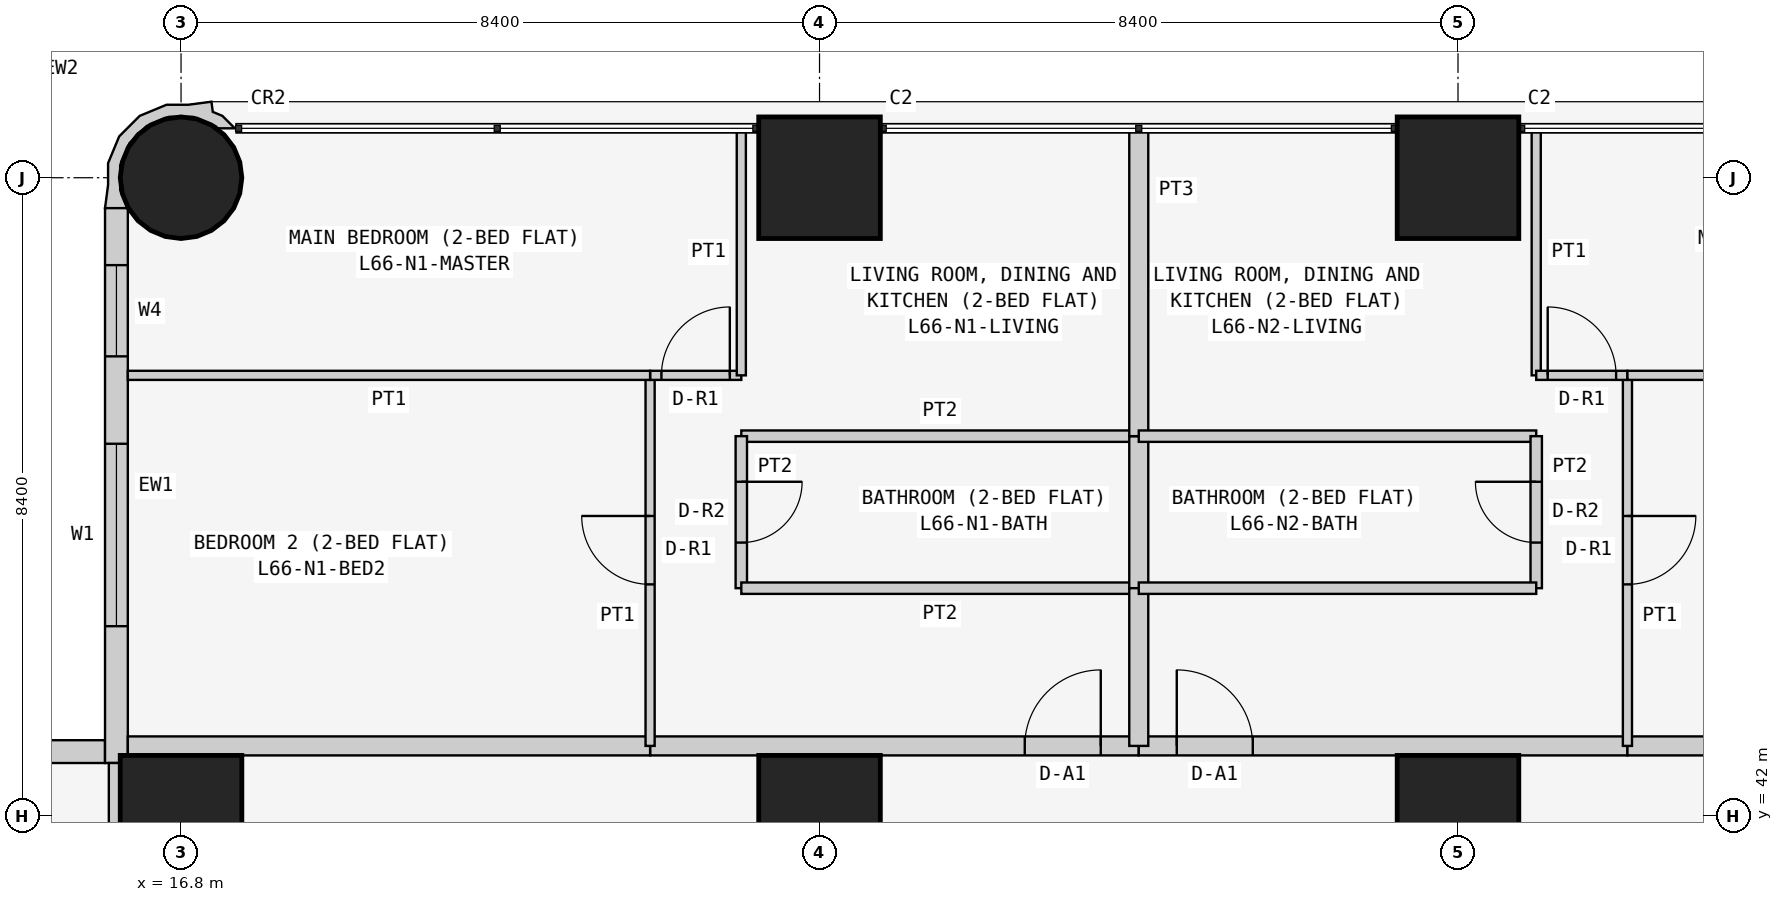
"""IFC4 building model, lengths in metres.
Left out: names, types, materials, properties, quantities, classifications, styles, units other than length and angle.
Written with IfcOpenShell. Run it as: python <this file> out.ifc"""

import sys

from ifc_helpers import new_model, si_unit, direction, frame, frame_2d, origin, origin_2d, place, context, subcontext, project, spatial, polyline, rectangle, circle, outline, extrude, element, fill, save


model = new_model("IFC4")
c1 = context("Model", 3, precision=1e-05, world=origin(), true_north=direction((0.0, 1.0)))
c2 = subcontext(c1, "Body", "Model", "MODEL_VIEW")
j1 = project(units=[si_unit("LENGTHUNIT", "METRE"), si_unit("PLANEANGLEUNIT", "RADIAN")], contexts=[c1])
p1 = place(None, origin())
s1 = spatial("IfcSite", under=j1, at=p1, CompositionType="ELEMENT")
p2 = place(p1, origin())
s2 = spatial("IfcBuilding", under=s1, at=p2, CompositionType="ELEMENT")
p3 = place(p2, frame((0.0, 0.0, 254.1)))
s3 = spatial("IfcBuildingStorey", under=s2, at=p3, CompositionType="ELEMENT", Elevation=254.1)
p4 = place(p3, frame((16.8, 42.0, 0.0), z_axis=(0.0, 0.0, 1.0), x_axis=(1.0, 0.0, 0.0)))
e1 = element("IfcColumn", 1, at=p4, inside=s3, PredefinedType="COLUMN", context=c2, shape_type="SweptSolid", body=[
    extrude(rectangle(XDim=1.6, YDim=1.6, at=origin_2d()), origin(), (0.0, 0.0, 1.0), 3.6),
])
p5 = place(p3, frame((16.8, 50.4, 0.0), z_axis=(0.0, 0.0, 1.0), x_axis=(1.0, 0.0, 0.0)))
e2 = element("IfcColumn", 2, at=p5, inside=s3, PredefinedType="COLUMN", context=c2, shape_type="SweptSolid", body=[
    extrude(circle(Radius=0.8, at=origin_2d()), origin(), (0.0, 0.0, 1.0), 3.6),
])
for number, where, z_axis, x_axis in (
    (3, (25.2, 42.0, 0.0), (0.0, 0.0, 1.0), (1.0, 0.0, 0.0)),
    (4, (25.2, 50.4, 0.0), (0.0, 0.0, 1.0), (1.0, 0.0, 0.0)),
    (5, (33.6, 42.0, 0.0), (0.0, 0.0, 1.0), (1.0, 0.0, 0.0)),
    (6, (33.6, 50.4, 0.0), (0.0, 0.0, 1.0), (1.0, 0.0, 0.0)),
):
    element("IfcColumn", number, at=place(p3, frame(where, z_axis=z_axis, x_axis=x_axis)), inside=s3, PredefinedType="COLUMN", context=c2, shape_type="SweptSolid", body=[
        extrude(rectangle(XDim=1.6, YDim=1.6, at=origin_2d()), origin(), (0.0, 0.0, 1.0), 3.6),
    ])
p6 = place(p3, frame((15.8, 42.85, 0.0), z_axis=(0.0, 0.0, 1.0), x_axis=(-1.0, 0.0, 0.0)))
e7 = element("IfcWall", 7, at=p6, inside=s3, PredefinedType="SOLIDWALL", context=c2, shape_type="SweptSolid", body=[
    extrude(rectangle(XDim=7.0, YDim=0.3, at=frame_2d((3.5, 0.0))), origin(), (0.0, 0.0, 1.0), 3.45),
])
p7 = place(p6, frame((1.5, 0.0, 0.9)))
e8 = element("IfcOpeningElement", 8, at=p7, cuts=e7, PredefinedType="OPENING", context=c2, shape_type="SweptSolid", body=[
    extrude(rectangle(XDim=2.4, YDim=1.5, at=frame_2d((1.2, 0.75))), frame((0.0, 0.16, 0.0), z_axis=(0.0, -1.0, 0.0), x_axis=(1.0, 0.0, 0.0)), (0.0, 0.0, 1.0), 0.32),
])
p8 = place(p6, frame((5.05, 0.0, 0.9)))
e9 = element("IfcOpeningElement", 9, at=p8, cuts=e7, PredefinedType="OPENING", context=c2, shape_type="SweptSolid", body=[
    extrude(rectangle(XDim=1.2, YDim=1.5, at=frame_2d((0.6, 0.75))), frame((0.0, 0.16, 0.0), z_axis=(0.0, -1.0, 0.0), x_axis=(1.0, 0.0, 0.0)), (0.0, 0.0, 1.0), 0.32),
])
p9 = place(p3, frame((15.95, 50.0, 0.0), z_axis=(0.0, 0.0, 1.0), x_axis=(0.0, -1.0, 0.0)))
e10 = element("IfcWall", 10, at=p9, inside=s3, PredefinedType="SOLIDWALL", context=c2, shape_type="SweptSolid", body=[
    extrude(rectangle(XDim=7.3, YDim=0.3, at=frame_2d((3.65, 0.0))), origin(), (0.0, 0.0, 1.0), 3.45),
])
p10 = place(p9, frame((3.1, 0.0, 0.9)))
e11 = element("IfcOpeningElement", 11, at=p10, cuts=e10, PredefinedType="OPENING", context=c2, shape_type="SweptSolid", body=[
    extrude(rectangle(XDim=2.4, YDim=1.5, at=frame_2d((1.2, 0.75))), frame((0.0, 0.16, 0.0), z_axis=(0.0, -1.0, 0.0), x_axis=(1.0, 0.0, 0.0)), (0.0, 0.0, 1.0), 0.32),
])
p11 = place(p9, frame((0.75, 0.0, 0.9)))
e12 = element("IfcOpeningElement", 12, at=p11, cuts=e10, PredefinedType="OPENING", context=c2, shape_type="SweptSolid", body=[
    extrude(rectangle(XDim=1.2, YDim=1.5, at=frame_2d((0.6, 0.75))), frame((0.0, 0.16, 0.0), z_axis=(0.0, -1.0, 0.0), x_axis=(1.0, 0.0, 0.0)), (0.0, 0.0, 1.0), 0.32),
])
p12 = place(p3, frame((17.448, 50.995, 0.0), z_axis=(0.0, 0.0, 1.0), x_axis=(-0.343276641956, 0.93923434088, 0.0)))
e13 = element("IfcWall", 13, at=p12, inside=s3, PredefinedType="SOLIDWALL", context=c2, shape_type="SweptSolid", body=[
    extrude(outline(polyline([(0.241, 0.023), (0.333, 0.124), (0.465, 0.094), (0.532, 0.393), (0.631, 0.663), (0.614, 1.045), (0.454, 1.391), (0.172, 1.649), (-0.098, 1.748), (-0.369, 1.89), (-0.509, 1.621), (-0.491, 1.615), (-0.479, 1.609), (-0.211, 1.62), (0.088, 1.511), (0.323, 1.295), (0.457, 1.006), (0.47, 0.688), (0.361, 0.389), (0.145, 0.154), (0.108, 0.137), (0.031, -0.075), (0.241, 0.023)])), origin(), (0.0, 0.0, 1.0), 3.45),
])
p13 = place(p3, frame((22.971, 42.925, 0.0), z_axis=(0.0, 0.0, 1.0), x_axis=(1.0, 0.0, 0.0)))
e14 = element("IfcWall", 14, at=p13, inside=s3, PredefinedType="PARTITIONING", context=c2, shape_type="SweptSolid", body=[
    extrude(rectangle(XDim=6.429, YDim=0.25, at=frame_2d((3.214, 0.0))), origin(), (0.0, 0.0, 1.0), 3.45),
])
p14 = place(p13, frame((4.929, 0.0, 0.0)))
e15 = element("IfcOpeningElement", 15, at=p14, cuts=e14, PredefinedType="OPENING", context=c2, shape_type="SweptSolid", body=[
    extrude(rectangle(XDim=1.0, YDim=2.1, at=frame_2d((0.5, 1.05))), frame((0.0, 0.135, 0.0), z_axis=(0.0, -1.0, 0.0), x_axis=(1.0, 0.0, 0.0)), (0.0, 0.0, 1.0), 0.27),
])
p15 = place(p3, frame((16.1, 42.925, 0.0), z_axis=(0.0, 0.0, 1.0), x_axis=(1.0, 0.0, 0.0)))
e16 = element("IfcWall", 16, at=p15, inside=s3, PredefinedType="PARTITIONING", context=c2, shape_type="SweptSolid", body=[
    extrude(rectangle(XDim=6.871, YDim=0.25, at=frame_2d((3.436, 0.0))), origin(), (0.0, 0.0, 1.0), 3.45),
])
p16 = place(p3, frame((29.4, 42.925, 0.0), z_axis=(0.0, 0.0, 1.0), x_axis=(1.0, 0.0, 0.0)))
e17 = element("IfcWall", 17, at=p16, inside=s3, PredefinedType="PARTITIONING", context=c2, shape_type="SweptSolid", body=[
    extrude(rectangle(XDim=6.429, YDim=0.25, at=frame_2d((3.215, 0.0))), origin(), (0.0, 0.0, 1.0), 3.45),
])
p17 = place(p16, frame((0.5, 0.0, 0.0)))
e18 = element("IfcOpeningElement", 18, at=p17, cuts=e17, PredefinedType="OPENING", context=c2, shape_type="SweptSolid", body=[
    extrude(rectangle(XDim=1.0, YDim=2.1, at=frame_2d((0.5, 1.05))), frame((0.0, 0.135, 0.0), z_axis=(0.0, -1.0, 0.0), x_axis=(1.0, 0.0, 0.0)), (0.0, 0.0, 1.0), 0.27),
])
p18 = place(p3, frame((35.829, 42.925, 0.0), z_axis=(0.0, 0.0, 1.0), x_axis=(1.0, 0.0, 0.0)))
e19 = element("IfcWall", 19, at=p18, inside=s3, PredefinedType="PARTITIONING", context=c2, shape_type="SweptSolid", body=[
    extrude(rectangle(XDim=6.871, YDim=0.25, at=frame_2d((3.436, 0.0))), origin(), (0.0, 0.0, 1.0), 3.45),
])
p19 = place(p3, frame((15.925, 31.143, 0.0), z_axis=(0.0, 0.0, 1.0), x_axis=(0.0, 1.0, 0.0)))
e20 = element("IfcWall", 20, at=p19, inside=s3, PredefinedType="PARTITIONING", context=c2, shape_type="SweptSolid", body=[
    extrude(rectangle(XDim=11.557, YDim=0.15, at=frame_2d((5.778, 0.0))), origin(), (0.0, 0.0, 1.0), 3.45),
])
p20 = place(p3, frame((29.4, 47.0, 0.0), z_axis=(0.0, 0.0, 1.0), x_axis=(-1.0, 0.0, 0.0)))
e21 = element("IfcWall", 21, at=p20, inside=s3, PredefinedType="PARTITIONING", context=c2, shape_type="SweptSolid", body=[
    extrude(rectangle(XDim=5.229, YDim=0.15, at=frame_2d((2.615, 0.0))), origin(), (0.0, 0.0, 1.0), 3.45),
])
p21 = place(p3, frame((24.171, 47.0, 0.0), z_axis=(0.0, 0.0, 1.0), x_axis=(0.0, -1.0, 0.0)))
e22 = element("IfcWall", 22, at=p21, inside=s3, PredefinedType="PARTITIONING", context=c2, shape_type="SweptSolid", body=[
    extrude(rectangle(XDim=2.0, YDim=0.15, at=frame_2d((1.0, 0.0))), origin(), (0.0, 0.0, 1.0), 3.45),
])
p22 = place(p21, frame((0.6, 0.0, 0.0)))
e23 = element("IfcOpeningElement", 23, at=p22, cuts=e22, PredefinedType="OPENING", context=c2, shape_type="SweptSolid", body=[
    extrude(rectangle(XDim=0.8, YDim=2.1, at=frame_2d((0.4, 1.05))), frame((0.0, 0.085, 0.0), z_axis=(0.0, -1.0, 0.0), x_axis=(1.0, 0.0, 0.0)), (0.0, 0.0, 1.0), 0.17),
])
p23 = place(p3, frame((24.171, 45.0, 0.0), z_axis=(0.0, 0.0, 1.0), x_axis=(1.0, 0.0, 0.0)))
e24 = element("IfcWall", 24, at=p23, inside=s3, PredefinedType="PARTITIONING", context=c2, shape_type="SweptSolid", body=[
    extrude(rectangle(XDim=5.229, YDim=0.15, at=frame_2d((2.615, 0.0))), origin(), (0.0, 0.0, 1.0), 3.45),
])
p24 = place(p3, frame((29.4, 45.0, 0.0), z_axis=(0.0, 0.0, 1.0), x_axis=(0.0, 1.0, 0.0)))
e25 = element("IfcWall", 25, at=p24, inside=s3, PredefinedType="PARTITIONING", context=c2, shape_type="SweptSolid", body=[
    extrude(rectangle(XDim=2.0, YDim=0.25, at=frame_2d((1.0, 0.0))), origin(), (0.0, 0.0, 1.0), 2.848),
])
p25 = place(p3, frame((22.971, 42.925, 0.0), z_axis=(0.0, 0.0, 1.0), x_axis=(0.0, 1.0, 0.0)))
e26 = element("IfcWall", 26, at=p25, inside=s3, PredefinedType="PARTITIONING", context=c2, shape_type="SweptSolid", body=[
    extrude(rectangle(XDim=4.875, YDim=0.12, at=frame_2d((2.438, 0.0))), origin(), (0.0, 0.0, 1.0), 3.45),
])
p26 = place(p25, frame((2.125, 0.0, 0.0)))
e27 = element("IfcOpeningElement", 27, at=p26, cuts=e26, PredefinedType="OPENING", context=c2, shape_type="SweptSolid", body=[
    extrude(rectangle(XDim=0.9, YDim=2.1, at=frame_2d((0.45, 1.05))), frame((0.0, 0.07, 0.0), z_axis=(0.0, -1.0, 0.0), x_axis=(1.0, 0.0, 0.0)), (0.0, 0.0, 1.0), 0.14),
])
p27 = place(p3, frame((22.971, 47.8, 0.0), z_axis=(0.0, 0.0, 1.0), x_axis=(1.0, 0.0, 0.0)))
e28 = element("IfcWall", 28, at=p27, inside=s3, PredefinedType="PARTITIONING", context=c2, shape_type="SweptSolid", body=[
    extrude(rectangle(XDim=1.2, YDim=0.12, at=frame_2d((0.6, 0.0))), origin(), (0.0, 0.0, 1.0), 3.45),
])
p28 = place(p27, frame((0.149, 0.0, 0.0)))
e29 = element("IfcOpeningElement", 29, at=p28, cuts=e28, PredefinedType="OPENING", context=c2, shape_type="SweptSolid", body=[
    extrude(rectangle(XDim=0.9, YDim=2.1, at=frame_2d((0.45, 1.05))), frame((0.0, 0.07, 0.0), z_axis=(0.0, -1.0, 0.0), x_axis=(1.0, 0.0, 0.0)), (0.0, 0.0, 1.0), 0.14),
])
p29 = place(p3, frame((24.171, 47.8, 0.0), z_axis=(0.0, 0.0, 1.0), x_axis=(0.0, 1.0, 0.0)))
e30 = element("IfcWall", 30, at=p29, inside=s3, PredefinedType="PARTITIONING", context=c2, shape_type="SweptSolid", body=[
    extrude(rectangle(XDim=3.25, YDim=0.12, at=frame_2d((1.625, 0.0))), origin(), (0.0, 0.0, 1.0), 3.45),
])
p30 = place(p3, frame((29.4, 45.0, 0.0), z_axis=(0.0, 0.0, 1.0), x_axis=(0.0, -1.0, 0.0)))
e31 = element("IfcWall", 31, at=p30, inside=s3, PredefinedType="PARTITIONING", context=c2, shape_type="SweptSolid", body=[
    extrude(rectangle(XDim=2.075, YDim=0.25, at=frame_2d((1.038, 0.0))), origin(), (0.0, 0.0, 1.0), 2.848),
])
p31 = place(p3, frame((29.4, 51.05, 0.0), z_axis=(0.0, 0.0, 1.0), x_axis=(0.0, -1.0, 0.0)))
e32 = element("IfcWall", 32, at=p31, inside=s3, PredefinedType="PARTITIONING", context=c2, shape_type="SweptSolid", body=[
    extrude(rectangle(XDim=4.05, YDim=0.25, at=frame_2d((2.025, 0.0))), origin(), (0.0, 0.0, 1.0), 2.848),
])
p32 = place(p3, frame((22.971, 47.8, 0.0), z_axis=(0.0, 0.0, 1.0), x_axis=(-1.0, 0.0, 0.0)))
e33 = element("IfcWall", 33, at=p32, inside=s3, PredefinedType="PARTITIONING", context=c2, shape_type="SweptSolid", body=[
    extrude(rectangle(XDim=6.871, YDim=0.12, at=frame_2d((3.436, 0.0))), origin(), (0.0, 0.0, 1.0), 3.45),
])
p33 = place(p3, frame((29.4, 47.0, 0.0), z_axis=(0.0, 0.0, 1.0), x_axis=(1.0, 0.0, 0.0)))
e34 = element("IfcWall", 34, at=p33, inside=s3, PredefinedType="PARTITIONING", context=c2, shape_type="SweptSolid", body=[
    extrude(rectangle(XDim=5.229, YDim=0.15, at=frame_2d((2.615, 0.0))), origin(), (0.0, 0.0, 1.0), 3.45),
])
p34 = place(p3, frame((34.629, 47.0, 0.0), z_axis=(0.0, 0.0, 1.0), x_axis=(0.0, -1.0, 0.0)))
e35 = element("IfcWall", 35, at=p34, inside=s3, PredefinedType="PARTITIONING", context=c2, shape_type="SweptSolid", body=[
    extrude(rectangle(XDim=2.0, YDim=0.15, at=frame_2d((1.0, 0.0))), origin(), (0.0, 0.0, 1.0), 3.45),
])
p35 = place(p34, frame((0.6, 0.0, 0.0)))
e36 = element("IfcOpeningElement", 36, at=p35, cuts=e35, PredefinedType="OPENING", context=c2, shape_type="SweptSolid", body=[
    extrude(rectangle(XDim=0.8, YDim=2.1, at=frame_2d((0.4, 1.05))), frame((0.0, 0.085, 0.0), z_axis=(0.0, -1.0, 0.0), x_axis=(1.0, 0.0, 0.0)), (0.0, 0.0, 1.0), 0.17),
])
p36 = place(p3, frame((34.629, 45.0, 0.0), z_axis=(0.0, 0.0, 1.0), x_axis=(-1.0, 0.0, 0.0)))
e37 = element("IfcWall", 37, at=p36, inside=s3, PredefinedType="PARTITIONING", context=c2, shape_type="SweptSolid", body=[
    extrude(rectangle(XDim=5.229, YDim=0.15, at=frame_2d((2.615, 0.0))), origin(), (0.0, 0.0, 1.0), 3.45),
])
p37 = place(p3, frame((35.829, 47.8, 0.0), z_axis=(0.0, 0.0, 1.0), x_axis=(0.0, -1.0, 0.0)))
e38 = element("IfcWall", 38, at=p37, inside=s3, PredefinedType="PARTITIONING", context=c2, shape_type="SweptSolid", body=[
    extrude(rectangle(XDim=4.875, YDim=0.12, at=frame_2d((2.438, 0.0))), origin(), (0.0, 0.0, 1.0), 3.45),
])
p38 = place(p37, frame((1.85, 0.0, 0.0)))
e39 = element("IfcOpeningElement", 39, at=p38, cuts=e38, PredefinedType="OPENING", context=c2, shape_type="SweptSolid", body=[
    extrude(rectangle(XDim=0.9, YDim=2.1, at=frame_2d((0.45, 1.05))), frame((0.0, 0.07, 0.0), z_axis=(0.0, -1.0, 0.0), x_axis=(1.0, 0.0, 0.0)), (0.0, 0.0, 1.0), 0.14),
])
p39 = place(p3, frame((34.629, 51.05, 0.0), z_axis=(0.0, 0.0, 1.0), x_axis=(0.0, -1.0, 0.0)))
e40 = element("IfcWall", 40, at=p39, inside=s3, PredefinedType="PARTITIONING", context=c2, shape_type="SweptSolid", body=[
    extrude(rectangle(XDim=3.25, YDim=0.12, at=frame_2d((1.625, 0.0))), origin(), (0.0, 0.0, 1.0), 3.45),
])
p40 = place(p3, frame((34.629, 47.8, 0.0), z_axis=(0.0, 0.0, 1.0), x_axis=(1.0, 0.0, 0.0)))
e41 = element("IfcWall", 41, at=p40, inside=s3, PredefinedType="PARTITIONING", context=c2, shape_type="SweptSolid", body=[
    extrude(rectangle(XDim=1.2, YDim=0.12, at=frame_2d((0.6, 0.0))), origin(), (0.0, 0.0, 1.0), 3.45),
])
p41 = place(p40, frame((0.151, 0.0, 0.0)))
e42 = element("IfcOpeningElement", 42, at=p41, cuts=e41, PredefinedType="OPENING", context=c2, shape_type="SweptSolid", body=[
    extrude(rectangle(XDim=0.9, YDim=2.1, at=frame_2d((0.45, 1.05))), frame((0.0, 0.07, 0.0), z_axis=(0.0, -1.0, 0.0), x_axis=(1.0, 0.0, 0.0)), (0.0, 0.0, 1.0), 0.14),
])
p42 = place(p3, frame((35.829, 47.8, 0.0), z_axis=(0.0, 0.0, 1.0), x_axis=(1.0, 0.0, 0.0)))
e43 = element("IfcWall", 43, at=p42, inside=s3, PredefinedType="PARTITIONING", context=c2, shape_type="SweptSolid", body=[
    extrude(rectangle(XDim=6.871, YDim=0.12, at=frame_2d((3.436, 0.0))), origin(), (0.0, 0.0, 1.0), 3.45),
])
p43 = place(p10, origin())
e44 = element("IfcWindow", 44, at=p43, inside=s3, PartitioningType="SINGLE_PANEL", PredefinedType="WINDOW", context=c2, shape_type="SweptSolid", body=[
    extrude(rectangle(XDim=2.4, YDim=1.5, at=frame_2d((1.2, 0.75))), frame((0.0, 0.03, 0.0), z_axis=(0.0, -1.0, 0.0), x_axis=(1.0, 0.0, 0.0)), (0.0, 0.0, 1.0), 0.06),
])
fill(e11, e44)
p44 = place(p11, origin())
e45 = element("IfcWindow", 45, at=p44, inside=s3, PartitioningType="SINGLE_PANEL", PredefinedType="WINDOW", context=c2, shape_type="SweptSolid", body=[
    extrude(rectangle(XDim=1.2, YDim=1.5, at=frame_2d((0.6, 0.75))), frame((0.0, 0.03, 0.0), z_axis=(0.0, -1.0, 0.0), x_axis=(1.0, 0.0, 0.0)), (0.0, 0.0, 1.0), 0.06),
])
fill(e12, e45)
p45 = place(p14, origin())
e46 = element("IfcDoor", 46, at=p45, inside=s3, OperationType="SINGLE_SWING_RIGHT", PredefinedType="DOOR", context=c2, shape_type="SweptSolid", body=[
    extrude(rectangle(XDim=1.0, YDim=2.1, at=frame_2d((0.5, 1.05))), frame((0.0, 0.025, 0.0), z_axis=(0.0, -1.0, 0.0), x_axis=(1.0, 0.0, 0.0)), (0.0, 0.0, 1.0), 0.05),
])
fill(e15, e46)
p46 = place(p22, origin())
e47 = element("IfcDoor", 47, at=p46, inside=s3, OperationType="SINGLE_SWING_LEFT", PredefinedType="DOOR", context=c2, shape_type="SweptSolid", body=[
    extrude(rectangle(XDim=0.8, YDim=2.1, at=frame_2d((0.4, 1.05))), frame((0.0, 0.025, 0.0), z_axis=(0.0, -1.0, 0.0), x_axis=(1.0, 0.0, 0.0)), (0.0, 0.0, 1.0), 0.05),
])
fill(e23, e47)
p47 = place(p26, origin())
e48 = element("IfcDoor", 48, at=p47, inside=s3, OperationType="SINGLE_SWING_RIGHT", PredefinedType="DOOR", context=c2, shape_type="SweptSolid", body=[
    extrude(rectangle(XDim=0.9, YDim=2.1, at=frame_2d((0.45, 1.05))), frame((0.0, 0.025, 0.0), z_axis=(0.0, -1.0, 0.0), x_axis=(1.0, 0.0, 0.0)), (0.0, 0.0, 1.0), 0.05),
])
fill(e27, e48)
p48 = place(p28, origin())
e49 = element("IfcDoor", 49, at=p48, inside=s3, OperationType="SINGLE_SWING_RIGHT", PredefinedType="DOOR", context=c2, shape_type="SweptSolid", body=[
    extrude(rectangle(XDim=0.9, YDim=2.1, at=frame_2d((0.45, 1.05))), frame((0.0, 0.025, 0.0), z_axis=(0.0, -1.0, 0.0), x_axis=(1.0, 0.0, 0.0)), (0.0, 0.0, 1.0), 0.05),
])
fill(e29, e49)
p49 = place(p17, origin())
e50 = element("IfcDoor", 50, at=p49, inside=s3, OperationType="SINGLE_SWING_LEFT", PredefinedType="DOOR", context=c2, shape_type="SweptSolid", body=[
    extrude(rectangle(XDim=1.0, YDim=2.1, at=frame_2d((0.5, 1.05))), frame((0.0, 0.025, 0.0), z_axis=(0.0, -1.0, 0.0), x_axis=(1.0, 0.0, 0.0)), (0.0, 0.0, 1.0), 0.05),
])
fill(e18, e50)
p50 = place(p35, frame((0.8, 0.0, 0.0), z_axis=(0.0, 0.0, 1.0), x_axis=(-1.0, 0.0, 0.0)))
e51 = element("IfcDoor", 51, at=p50, inside=s3, OperationType="SINGLE_SWING_RIGHT", PredefinedType="DOOR", context=c2, shape_type="SweptSolid", body=[
    extrude(rectangle(XDim=0.8, YDim=2.1, at=frame_2d((0.4, 1.05))), frame((0.0, 0.025, 0.0), z_axis=(0.0, -1.0, 0.0), x_axis=(1.0, 0.0, 0.0)), (0.0, 0.0, 1.0), 0.05),
])
fill(e36, e51)
p51 = place(p38, origin())
e52 = element("IfcDoor", 52, at=p51, inside=s3, OperationType="SINGLE_SWING_LEFT", PredefinedType="DOOR", context=c2, shape_type="SweptSolid", body=[
    extrude(rectangle(XDim=0.9, YDim=2.1, at=frame_2d((0.45, 1.05))), frame((0.0, 0.025, 0.0), z_axis=(0.0, -1.0, 0.0), x_axis=(1.0, 0.0, 0.0)), (0.0, 0.0, 1.0), 0.05),
])
fill(e39, e52)
p52 = place(p41, origin())
e53 = element("IfcDoor", 53, at=p52, inside=s3, OperationType="SINGLE_SWING_LEFT", PredefinedType="DOOR", context=c2, shape_type="SweptSolid", body=[
    extrude(rectangle(XDim=0.9, YDim=2.1, at=frame_2d((0.45, 1.05))), frame((0.0, 0.025, 0.0), z_axis=(0.0, -1.0, 0.0), x_axis=(1.0, 0.0, 0.0)), (0.0, 0.0, 1.0), 0.05),
])
fill(e42, e53)
save(model, sys.argv[1])
